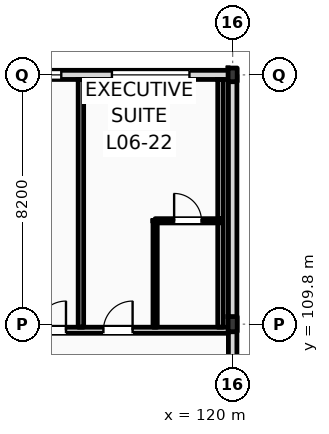
"""IFC4 building model, lengths in metres.
Left out: names, types, materials, properties, quantities, classifications, styles, units other than length and angle.
Written with IfcOpenShell. Run it as: python <this file> out.ifc"""

import sys

from ifc_helpers import new_model, si_unit, direction, frame, frame_2d, origin, origin_2d, place, context, subcontext, project, spatial, rectangle, i_section, extrude, element, fill, save


model = new_model("IFC4")
c1 = context("Model", 3, precision=1e-05, world=origin(), true_north=direction((0.0, 1.0)))
c2 = subcontext(c1, "Body", "Model", "MODEL_VIEW")
j1 = project(units=[si_unit("LENGTHUNIT", "METRE"), si_unit("PLANEANGLEUNIT", "RADIAN")], contexts=[c1])
p1 = place(None, origin())
s1 = spatial("IfcSite", under=j1, at=p1, CompositionType="ELEMENT")
p2 = place(p1, origin())
s2 = spatial("IfcBuilding", under=s1, at=p2, CompositionType="ELEMENT")
p3 = place(p2, frame((0.0, 0.0, 28.2)))
s3 = spatial("IfcBuildingStorey", under=s2, at=p3, CompositionType="ELEMENT", Elevation=28.2)
p4 = place(p3, frame((120.0, 109.8, 0.0), z_axis=(0.0, 0.0, 1.0), x_axis=(1.0, 0.0, 0.0)))
e1 = element("IfcColumn", 1, at=p4, inside=s3, PredefinedType="COLUMN", context=c2, shape_type="SweptSolid", body=[
    extrude(i_section(OverallWidth=0.3, OverallDepth=0.5, WebThickness=0.014, FlangeThickness=0.028, FilletRadius=0.027, at=origin_2d()), origin(), (0.0, 0.0, 1.0), 3.6),
])
p5 = place(p3, frame((120.0, 118.0, 0.0), z_axis=(0.0, 0.0, 1.0), x_axis=(1.0, 0.0, 0.0)))
e2 = element("IfcColumn", 2, at=p5, inside=s3, PredefinedType="COLUMN", context=c2, shape_type="SweptSolid", body=[
    extrude(i_section(OverallWidth=0.3, OverallDepth=0.45, WebThickness=0.014, FlangeThickness=0.026, FilletRadius=0.027, at=origin_2d()), origin(), (0.0, 0.0, 1.0), 3.6),
])
p6 = place(p3, frame((22.5, 118.0, 0.0), z_axis=(0.0, 0.0, 1.0), x_axis=(1.0, 0.0, 0.0)))
e3 = element("IfcWall", 3, at=p6, inside=s3, PredefinedType="STANDARD", context=c2, shape_type="SweptSolid", body=[
    extrude(rectangle(XDim=97.5, YDim=0.3, at=frame_2d((48.75, 0.0))), origin(), (0.0, 0.0, 1.0), 2.8),
])
p7 = place(p6, frame((0.91, 0.0, 0.9)))
e4 = element("IfcOpeningElement", 4, at=p7, cuts=e3, PredefinedType="OPENING", context=c2, shape_type="SweptSolid", body=[
    extrude(rectangle(XDim=0.9, YDim=1.72, at=frame_2d((0.45, 0.86))), frame((0.0, 0.16, 0.0), z_axis=(0.0, -1.0, 0.0), x_axis=(1.0, 0.0, 0.0)), (0.0, 0.0, 1.0), 0.32),
])
p8 = place(p6, frame((6.561, 0.0, 0.0)))
e5 = element("IfcOpeningElement", 5, at=p8, cuts=e3, PredefinedType="OPENING", context=c2, shape_type="SweptSolid", body=[
    extrude(rectangle(XDim=1.2, YDim=2.25, at=frame_2d((0.6, 1.125))), frame((0.0, 0.16, 0.0), z_axis=(0.0, -1.0, 0.0), x_axis=(1.0, 0.0, 0.0)), (0.0, 0.0, 1.0), 0.32),
])
p9 = place(p6, frame((11.477, 0.0, 0.9)))
e6 = element("IfcOpeningElement", 6, at=p9, cuts=e3, PredefinedType="OPENING", context=c2, shape_type="SweptSolid", body=[
    extrude(rectangle(XDim=1.1, YDim=1.5, at=frame_2d((0.55, 0.75))), frame((0.0, 0.16, 0.0), z_axis=(0.0, -1.0, 0.0), x_axis=(1.0, 0.0, 0.0)), (0.0, 0.0, 1.0), 0.32),
])
p10 = place(p6, frame((15.194, 0.0, 0.9)))
e7 = element("IfcOpeningElement", 7, at=p10, cuts=e3, PredefinedType="OPENING", context=c2, shape_type="SweptSolid", body=[
    extrude(rectangle(XDim=1.25, YDim=1.6, at=frame_2d((0.625, 0.8))), frame((0.0, 0.16, 0.0), z_axis=(0.0, -1.0, 0.0), x_axis=(1.0, 0.0, 0.0)), (0.0, 0.0, 1.0), 0.32),
])
p11 = place(p6, frame((19.509, 0.0, 0.9)))
e8 = element("IfcOpeningElement", 8, at=p11, cuts=e3, PredefinedType="OPENING", context=c2, shape_type="SweptSolid", body=[
    extrude(rectangle(XDim=1.4, YDim=1.7, at=frame_2d((0.7, 0.85))), frame((0.0, 0.16, 0.0), z_axis=(0.0, -1.0, 0.0), x_axis=(1.0, 0.0, 0.0)), (0.0, 0.0, 1.0), 0.32),
])
p12 = place(p6, frame((23.258, 0.0, 0.0)))
e9 = element("IfcOpeningElement", 9, at=p12, cuts=e3, PredefinedType="OPENING", context=c2, shape_type="SweptSolid", body=[
    extrude(rectangle(XDim=1.2, YDim=2.25, at=frame_2d((0.6, 1.125))), frame((0.0, 0.16, 0.0), z_axis=(0.0, -1.0, 0.0), x_axis=(1.0, 0.0, 0.0)), (0.0, 0.0, 1.0), 0.32),
])
p13 = place(p6, frame((28.115, 0.0, 0.9)))
e10 = element("IfcOpeningElement", 10, at=p13, cuts=e3, PredefinedType="OPENING", context=c2, shape_type="SweptSolid", body=[
    extrude(rectangle(XDim=1.75, YDim=1.72, at=frame_2d((0.875, 0.86))), frame((0.0, 0.16, 0.0), z_axis=(0.0, -1.0, 0.0), x_axis=(1.0, 0.0, 0.0)), (0.0, 0.0, 1.0), 0.32),
])
p14 = place(p6, frame((31.582, 0.0, 0.9)))
e11 = element("IfcOpeningElement", 11, at=p14, cuts=e3, PredefinedType="OPENING", context=c2, shape_type="SweptSolid", body=[
    extrude(rectangle(XDim=1.35, YDim=1.72, at=frame_2d((0.675, 0.86))), frame((0.0, 0.16, 0.0), z_axis=(0.0, -1.0, 0.0), x_axis=(1.0, 0.0, 0.0)), (0.0, 0.0, 1.0), 0.32),
])
p15 = place(p6, frame((37.379, 0.0, 0.0)))
e12 = element("IfcOpeningElement", 12, at=p15, cuts=e3, PredefinedType="OPENING", context=c2, shape_type="SweptSolid", body=[
    extrude(rectangle(XDim=1.2, YDim=2.25, at=frame_2d((0.6, 1.125))), frame((0.0, 0.16, 0.0), z_axis=(0.0, -1.0, 0.0), x_axis=(1.0, 0.0, 0.0)), (0.0, 0.0, 1.0), 0.32),
])
p16 = place(p6, frame((42.663, 0.0, 0.9)))
e13 = element("IfcOpeningElement", 13, at=p16, cuts=e3, PredefinedType="OPENING", context=c2, shape_type="SweptSolid", body=[
    extrude(rectangle(XDim=1.35, YDim=1.72, at=frame_2d((0.675, 0.86))), frame((0.0, 0.16, 0.0), z_axis=(0.0, -1.0, 0.0), x_axis=(1.0, 0.0, 0.0)), (0.0, 0.0, 1.0), 0.32),
])
p17 = place(p6, frame((45.119, 0.0, 0.9)))
e14 = element("IfcOpeningElement", 14, at=p17, cuts=e3, PredefinedType="OPENING", context=c2, shape_type="SweptSolid", body=[
    extrude(rectangle(XDim=2.871, YDim=1.72, at=frame_2d((1.436, 0.86))), frame((0.0, 0.16, 0.0), z_axis=(0.0, -1.0, 0.0), x_axis=(1.0, 0.0, 0.0)), (0.0, 0.0, 1.0), 0.32),
])
p18 = place(p6, frame((50.41, 0.0, 0.9)))
e15 = element("IfcOpeningElement", 15, at=p18, cuts=e3, PredefinedType="OPENING", context=c2, shape_type="SweptSolid", body=[
    extrude(rectangle(XDim=1.8, YDim=1.72, at=frame_2d((0.9, 0.86))), frame((0.0, 0.16, 0.0), z_axis=(0.0, -1.0, 0.0), x_axis=(1.0, 0.0, 0.0)), (0.0, 0.0, 1.0), 0.32),
])
p19 = place(p6, frame((54.375, 0.0, 0.0)))
e16 = element("IfcOpeningElement", 16, at=p19, cuts=e3, PredefinedType="OPENING", context=c2, shape_type="SweptSolid", body=[
    extrude(rectangle(XDim=1.2, YDim=2.25, at=frame_2d((0.6, 1.125))), frame((0.0, 0.16, 0.0), z_axis=(0.0, -1.0, 0.0), x_axis=(1.0, 0.0, 0.0)), (0.0, 0.0, 1.0), 0.32),
])
p20 = place(p6, frame((59.052, 0.0, 0.9)))
e17 = element("IfcOpeningElement", 17, at=p20, cuts=e3, PredefinedType="OPENING", context=c2, shape_type="SweptSolid", body=[
    extrude(rectangle(XDim=1.35, YDim=1.72, at=frame_2d((0.675, 0.86))), frame((0.0, 0.16, 0.0), z_axis=(0.0, -1.0, 0.0), x_axis=(1.0, 0.0, 0.0)), (0.0, 0.0, 1.0), 0.32),
])
p21 = place(p6, frame((62.768, 0.0, 0.9)))
e18 = element("IfcOpeningElement", 18, at=p21, cuts=e3, PredefinedType="OPENING", context=c2, shape_type="SweptSolid", body=[
    extrude(rectangle(XDim=1.5, YDim=1.72, at=frame_2d((0.75, 0.86))), frame((0.0, 0.16, 0.0), z_axis=(0.0, -1.0, 0.0), x_axis=(1.0, 0.0, 0.0)), (0.0, 0.0, 1.0), 0.32),
])
p22 = place(p6, frame((68.498, 0.0, 0.0)))
e19 = element("IfcOpeningElement", 19, at=p22, cuts=e3, PredefinedType="OPENING", context=c2, shape_type="SweptSolid", body=[
    extrude(rectangle(XDim=1.2, YDim=2.25, at=frame_2d((0.6, 1.125))), frame((0.0, 0.16, 0.0), z_axis=(0.0, -1.0, 0.0), x_axis=(1.0, 0.0, 0.0)), (0.0, 0.0, 1.0), 0.32),
])
p23 = place(p6, frame((71.265, 0.0, 0.9)))
e20 = element("IfcOpeningElement", 20, at=p23, cuts=e3, PredefinedType="OPENING", context=c2, shape_type="SweptSolid", body=[
    extrude(rectangle(XDim=0.9, YDim=1.72, at=frame_2d((0.45, 0.86))), frame((0.0, 0.16, 0.0), z_axis=(0.0, -1.0, 0.0), x_axis=(1.0, 0.0, 0.0)), (0.0, 0.0, 1.0), 0.32),
])
p24 = place(p6, frame((76.316, 0.0, 0.9)))
e21 = element("IfcOpeningElement", 21, at=p24, cuts=e3, PredefinedType="OPENING", context=c2, shape_type="SweptSolid", body=[
    extrude(rectangle(XDim=1.95, YDim=1.72, at=frame_2d((0.975, 0.86))), frame((0.0, 0.16, 0.0), z_axis=(0.0, -1.0, 0.0), x_axis=(1.0, 0.0, 0.0)), (0.0, 0.0, 1.0), 0.32),
])
p25 = place(p6, frame((81.632, 0.0, 0.9)))
e22 = element("IfcOpeningElement", 22, at=p25, cuts=e3, PredefinedType="OPENING", context=c2, shape_type="SweptSolid", body=[
    extrude(rectangle(XDim=1.35, YDim=1.72, at=frame_2d((0.675, 0.86))), frame((0.0, 0.16, 0.0), z_axis=(0.0, -1.0, 0.0), x_axis=(1.0, 0.0, 0.0)), (0.0, 0.0, 1.0), 0.32),
])
p26 = place(p6, frame((84.948, 0.0, 0.9)))
e23 = element("IfcOpeningElement", 23, at=p26, cuts=e3, PredefinedType="OPENING", context=c2, shape_type="SweptSolid", body=[
    extrude(rectangle(XDim=2.25, YDim=1.72, at=frame_2d((1.125, 0.86))), frame((0.0, 0.16, 0.0), z_axis=(0.0, -1.0, 0.0), x_axis=(1.0, 0.0, 0.0)), (0.0, 0.0, 1.0), 0.32),
])
p27 = place(p6, frame((90.063, 0.0, 0.9)))
e24 = element("IfcOpeningElement", 24, at=p27, cuts=e3, PredefinedType="OPENING", context=c2, shape_type="SweptSolid", body=[
    extrude(rectangle(XDim=1.8, YDim=1.72, at=frame_2d((0.9, 0.86))), frame((0.0, 0.16, 0.0), z_axis=(0.0, -1.0, 0.0), x_axis=(1.0, 0.0, 0.0)), (0.0, 0.0, 1.0), 0.32),
])
p28 = place(p6, frame((93.529, 0.0, 0.9)))
e25 = element("IfcOpeningElement", 25, at=p28, cuts=e3, PredefinedType="OPENING", context=c2, shape_type="SweptSolid", body=[
    extrude(rectangle(XDim=2.55, YDim=1.72, at=frame_2d((1.275, 0.86))), frame((0.0, 0.16, 0.0), z_axis=(0.0, -1.0, 0.0), x_axis=(1.0, 0.0, 0.0)), (0.0, 0.0, 1.0), 0.32),
])
p29 = place(p3, frame((120.0, 96.0, 0.0), z_axis=(0.0, 0.0, 1.0), x_axis=(0.0, 1.0, 0.0)))
e26 = element("IfcWall", 26, at=p29, inside=s3, PredefinedType="STANDARD", context=c2, shape_type="SweptSolid", body=[
    extrude(rectangle(XDim=22.0, YDim=0.28, at=frame_2d((11.0, 0.0))), origin(), (0.0, 0.0, 1.0), 2.99),
])
p30 = place(p3, frame((10.65, 109.6, 0.0), z_axis=(0.0, 0.0, 1.0), x_axis=(1.0, 0.0, 0.0)))
e27 = element("IfcWall", 27, at=p30, inside=s3, PredefinedType="PARTITIONING", context=c2, shape_type="SweptSolid", body=[
    extrude(rectangle(XDim=109.21, YDim=0.2, at=frame_2d((54.605, 0.0))), origin(), (0.0, 0.0, 1.0), 2.8),
])
p31 = place(p30, frame((12.611, 0.0, 0.0)))
e28 = element("IfcOpeningElement", 28, at=p31, cuts=e27, PredefinedType="OPENING", context=c2, shape_type="SweptSolid", body=[
    extrude(rectangle(XDim=1.02, YDim=2.2, at=frame_2d((0.51, 1.1))), frame((0.0, 0.11, 0.0), z_axis=(0.0, -1.0, 0.0), x_axis=(1.0, 0.0, 0.0)), (0.0, 0.0, 1.0), 0.22),
])
p32 = place(p30, frame((19.451, 0.0, 0.0)))
e29 = element("IfcOpeningElement", 29, at=p32, cuts=e27, PredefinedType="OPENING", context=c2, shape_type="SweptSolid", body=[
    extrude(rectangle(XDim=1.02, YDim=2.2, at=frame_2d((0.51, 1.1))), frame((0.0, 0.11, 0.0), z_axis=(0.0, -1.0, 0.0), x_axis=(1.0, 0.0, 0.0)), (0.0, 0.0, 1.0), 0.22),
])
p33 = place(p30, frame((23.842, 0.0, 0.0)))
e30 = element("IfcOpeningElement", 30, at=p33, cuts=e27, PredefinedType="OPENING", context=c2, shape_type="SweptSolid", body=[
    extrude(rectangle(XDim=1.02, YDim=2.2, at=frame_2d((0.51, 1.1))), frame((0.0, 0.11, 0.0), z_axis=(0.0, -1.0, 0.0), x_axis=(1.0, 0.0, 0.0)), (0.0, 0.0, 1.0), 0.22),
])
p34 = place(p30, frame((26.084, 0.0, 0.0)))
e31 = element("IfcOpeningElement", 31, at=p34, cuts=e27, PredefinedType="OPENING", context=c2, shape_type="SweptSolid", body=[
    extrude(rectangle(XDim=1.02, YDim=2.2, at=frame_2d((0.51, 1.1))), frame((0.0, 0.11, 0.0), z_axis=(0.0, -1.0, 0.0), x_axis=(1.0, 0.0, 0.0)), (0.0, 0.0, 1.0), 0.22),
])
p35 = place(p30, frame((32.655, 0.0, 0.0)))
e32 = element("IfcOpeningElement", 32, at=p35, cuts=e27, PredefinedType="OPENING", context=c2, shape_type="SweptSolid", body=[
    extrude(rectangle(XDim=0.96, YDim=2.2, at=frame_2d((0.48, 1.1))), frame((0.0, 0.11, 0.0), z_axis=(0.0, -1.0, 0.0), x_axis=(1.0, 0.0, 0.0)), (0.0, 0.0, 1.0), 0.22),
])
p36 = place(p30, frame((34.895, 0.0, 0.0)))
e33 = element("IfcOpeningElement", 33, at=p36, cuts=e27, PredefinedType="OPENING", context=c2, shape_type="SweptSolid", body=[
    extrude(rectangle(XDim=0.96, YDim=2.2, at=frame_2d((0.48, 1.1))), frame((0.0, 0.11, 0.0), z_axis=(0.0, -1.0, 0.0), x_axis=(1.0, 0.0, 0.0)), (0.0, 0.0, 1.0), 0.22),
])
p37 = place(p30, frame((41.436, 0.0, 0.0)))
e34 = element("IfcOpeningElement", 34, at=p37, cuts=e27, PredefinedType="OPENING", context=c2, shape_type="SweptSolid", body=[
    extrude(rectangle(XDim=0.96, YDim=2.2, at=frame_2d((0.48, 1.1))), frame((0.0, 0.11, 0.0), z_axis=(0.0, -1.0, 0.0), x_axis=(1.0, 0.0, 0.0)), (0.0, 0.0, 1.0), 0.22),
])
p38 = place(p30, frame((43.427, 0.0, 0.0)))
e35 = element("IfcOpeningElement", 35, at=p38, cuts=e27, PredefinedType="OPENING", context=c2, shape_type="SweptSolid", body=[
    extrude(rectangle(XDim=0.96, YDim=2.2, at=frame_2d((0.48, 1.1))), frame((0.0, 0.11, 0.0), z_axis=(0.0, -1.0, 0.0), x_axis=(1.0, 0.0, 0.0)), (0.0, 0.0, 1.0), 0.22),
])
p39 = place(p30, frame((50.218, 0.0, 0.0)))
e36 = element("IfcOpeningElement", 36, at=p39, cuts=e27, PredefinedType="OPENING", context=c2, shape_type="SweptSolid", body=[
    extrude(rectangle(XDim=0.96, YDim=2.2, at=frame_2d((0.48, 1.1))), frame((0.0, 0.11, 0.0), z_axis=(0.0, -1.0, 0.0), x_axis=(1.0, 0.0, 0.0)), (0.0, 0.0, 1.0), 0.22),
])
p40 = place(p30, frame((54.859, 0.0, 0.0)))
e37 = element("IfcOpeningElement", 37, at=p40, cuts=e27, PredefinedType="OPENING", context=c2, shape_type="SweptSolid", body=[
    extrude(rectangle(XDim=0.96, YDim=2.2, at=frame_2d((0.48, 1.1))), frame((0.0, 0.11, 0.0), z_axis=(0.0, -1.0, 0.0), x_axis=(1.0, 0.0, 0.0)), (0.0, 0.0, 1.0), 0.22),
])
p41 = place(p30, frame((59.0, 0.0, 0.0)))
e38 = element("IfcOpeningElement", 38, at=p41, cuts=e27, PredefinedType="OPENING", context=c2, shape_type="SweptSolid", body=[
    extrude(rectangle(XDim=0.96, YDim=2.2, at=frame_2d((0.48, 1.1))), frame((0.0, 0.11, 0.0), z_axis=(0.0, -1.0, 0.0), x_axis=(1.0, 0.0, 0.0)), (0.0, 0.0, 1.0), 0.22),
])
p42 = place(p30, frame((63.39, 0.0, 0.0)))
e39 = element("IfcOpeningElement", 39, at=p42, cuts=e27, PredefinedType="OPENING", context=c2, shape_type="SweptSolid", body=[
    extrude(rectangle(XDim=0.96, YDim=2.2, at=frame_2d((0.48, 1.1))), frame((0.0, 0.11, 0.0), z_axis=(0.0, -1.0, 0.0), x_axis=(1.0, 0.0, 0.0)), (0.0, 0.0, 1.0), 0.22),
])
p43 = place(p30, frame((65.631, 0.0, 0.0)))
e40 = element("IfcOpeningElement", 40, at=p43, cuts=e27, PredefinedType="OPENING", context=c2, shape_type="SweptSolid", body=[
    extrude(rectangle(XDim=0.96, YDim=2.2, at=frame_2d((0.48, 1.1))), frame((0.0, 0.11, 0.0), z_axis=(0.0, -1.0, 0.0), x_axis=(1.0, 0.0, 0.0)), (0.0, 0.0, 1.0), 0.22),
])
p44 = place(p30, frame((72.172, 0.0, 0.0)))
e41 = element("IfcOpeningElement", 41, at=p44, cuts=e27, PredefinedType="OPENING", context=c2, shape_type="SweptSolid", body=[
    extrude(rectangle(XDim=0.96, YDim=2.2, at=frame_2d((0.48, 1.1))), frame((0.0, 0.11, 0.0), z_axis=(0.0, -1.0, 0.0), x_axis=(1.0, 0.0, 0.0)), (0.0, 0.0, 1.0), 0.22),
])
p45 = place(p30, frame((74.413, 0.0, 0.0)))
e42 = element("IfcOpeningElement", 42, at=p45, cuts=e27, PredefinedType="OPENING", context=c2, shape_type="SweptSolid", body=[
    extrude(rectangle(XDim=0.96, YDim=2.2, at=frame_2d((0.48, 1.1))), frame((0.0, 0.11, 0.0), z_axis=(0.0, -1.0, 0.0), x_axis=(1.0, 0.0, 0.0)), (0.0, 0.0, 1.0), 0.22),
])
p46 = place(p30, frame((80.954, 0.0, 0.0)))
e43 = element("IfcOpeningElement", 43, at=p46, cuts=e27, PredefinedType="OPENING", context=c2, shape_type="SweptSolid", body=[
    extrude(rectangle(XDim=0.96, YDim=2.2, at=frame_2d((0.48, 1.1))), frame((0.0, 0.11, 0.0), z_axis=(0.0, -1.0, 0.0), x_axis=(1.0, 0.0, 0.0)), (0.0, 0.0, 1.0), 0.22),
])
p47 = place(p30, frame((83.195, 0.0, 0.0)))
e44 = element("IfcOpeningElement", 44, at=p47, cuts=e27, PredefinedType="OPENING", context=c2, shape_type="SweptSolid", body=[
    extrude(rectangle(XDim=0.96, YDim=2.2, at=frame_2d((0.48, 1.1))), frame((0.0, 0.11, 0.0), z_axis=(0.0, -1.0, 0.0), x_axis=(1.0, 0.0, 0.0)), (0.0, 0.0, 1.0), 0.22),
])
p48 = place(p30, frame((89.735, 0.0, 0.0)))
e45 = element("IfcOpeningElement", 45, at=p48, cuts=e27, PredefinedType="OPENING", context=c2, shape_type="SweptSolid", body=[
    extrude(rectangle(XDim=0.96, YDim=2.2, at=frame_2d((0.48, 1.1))), frame((0.0, 0.11, 0.0), z_axis=(0.0, -1.0, 0.0), x_axis=(1.0, 0.0, 0.0)), (0.0, 0.0, 1.0), 0.22),
])
p49 = place(p30, frame((94.126, 0.0, 0.0)))
e46 = element("IfcOpeningElement", 46, at=p49, cuts=e27, PredefinedType="OPENING", context=c2, shape_type="SweptSolid", body=[
    extrude(rectangle(XDim=0.96, YDim=2.2, at=frame_2d((0.48, 1.1))), frame((0.0, 0.11, 0.0), z_axis=(0.0, -1.0, 0.0), x_axis=(1.0, 0.0, 0.0)), (0.0, 0.0, 1.0), 0.22),
])
p50 = place(p30, frame((98.517, 0.0, 0.0)))
e47 = element("IfcOpeningElement", 47, at=p50, cuts=e27, PredefinedType="OPENING", context=c2, shape_type="SweptSolid", body=[
    extrude(rectangle(XDim=0.96, YDim=2.2, at=frame_2d((0.48, 1.1))), frame((0.0, 0.11, 0.0), z_axis=(0.0, -1.0, 0.0), x_axis=(1.0, 0.0, 0.0)), (0.0, 0.0, 1.0), 0.22),
])
p51 = place(p30, frame((102.908, 0.0, 0.0)))
e48 = element("IfcOpeningElement", 48, at=p51, cuts=e27, PredefinedType="OPENING", context=c2, shape_type="SweptSolid", body=[
    extrude(rectangle(XDim=0.96, YDim=2.2, at=frame_2d((0.48, 1.1))), frame((0.0, 0.11, 0.0), z_axis=(0.0, -1.0, 0.0), x_axis=(1.0, 0.0, 0.0)), (0.0, 0.0, 1.0), 0.22),
])
p52 = place(p30, frame((105.099, 0.0, 0.0)))
e49 = element("IfcOpeningElement", 49, at=p52, cuts=e27, PredefinedType="OPENING", context=c2, shape_type="SweptSolid", body=[
    extrude(rectangle(XDim=0.96, YDim=2.2, at=frame_2d((0.48, 1.1))), frame((0.0, 0.11, 0.0), z_axis=(0.0, -1.0, 0.0), x_axis=(1.0, 0.0, 0.0)), (0.0, 0.0, 1.0), 0.22),
])
p53 = place(p30, frame((2.716, 0.0, 0.0)))
e50 = element("IfcOpeningElement", 50, at=p53, cuts=e27, PredefinedType="OPENING", context=c2, shape_type="SweptSolid", body=[
    extrude(rectangle(XDim=1.35, YDim=2.25, at=frame_2d((0.675, 1.125))), frame((0.0, 0.11, 0.0), z_axis=(0.0, -1.0, 0.0), x_axis=(1.0, 0.0, 0.0)), (0.0, 0.0, 1.0), 0.22),
])
p54 = place(p30, frame((6.65, 0.0, 0.0)))
e51 = element("IfcOpeningElement", 51, at=p54, cuts=e27, PredefinedType="OPENING", context=c2, shape_type="SweptSolid", body=[
    extrude(rectangle(XDim=1.35, YDim=2.25, at=frame_2d((0.675, 1.125))), frame((0.0, 0.11, 0.0), z_axis=(0.0, -1.0, 0.0), x_axis=(1.0, 0.0, 0.0)), (0.0, 0.0, 1.0), 0.22),
])
p55 = place(p30, frame((10.583, 0.0, 0.0)))
e52 = element("IfcOpeningElement", 52, at=p55, cuts=e27, PredefinedType="OPENING", context=c2, shape_type="SweptSolid", body=[
    extrude(rectangle(XDim=1.35, YDim=2.25, at=frame_2d((0.675, 1.125))), frame((0.0, 0.11, 0.0), z_axis=(0.0, -1.0, 0.0), x_axis=(1.0, 0.0, 0.0)), (0.0, 0.0, 1.0), 0.22),
])
for number, where, z_axis, x_axis in (
    (53, (115.009, 109.7, 0.0), (0.0, 0.0, 1.0), (0.0, 1.0, 0.0)),
    (54, (119.6, 109.7, 0.0), (0.0, 0.0, 1.0), (0.0, 1.0, 0.0)),
):
    element("IfcWall", number, at=place(p3, frame(where, z_axis=z_axis, x_axis=x_axis)), inside=s3, PredefinedType="PARTITIONING", context=c2, shape_type="SweptSolid", body=[
        extrude(rectangle(XDim=8.15, YDim=0.18, at=frame_2d((4.075, 0.0))), origin(), (0.0, 0.0, 1.0), 3.36),
    ])
p56 = place(p3, frame((117.45, 109.7, 0.0), z_axis=(0.0, 0.0, 1.0), x_axis=(0.0, 1.0, 0.0)))
e55 = element("IfcWall", 55, at=p56, inside=s3, PredefinedType="PARTITIONING", context=c2, shape_type="SweptSolid", body=[
    extrude(rectangle(XDim=3.5, YDim=0.14, at=frame_2d((1.75, 0.0))), origin(), (0.0, 0.0, 1.0), 3.36),
])
p57 = place(p3, frame((117.45, 113.2, 0.0), z_axis=(0.0, 0.0, 1.0), x_axis=(1.0, 0.0, 0.0)))
e56 = element("IfcWall", 56, at=p57, inside=s3, PredefinedType="PARTITIONING", context=c2, shape_type="SweptSolid", body=[
    extrude(rectangle(XDim=2.15, YDim=0.14, at=frame_2d((1.075, 0.0))), origin(), (0.0, 0.0, 1.0), 3.36),
])
p58 = place(p57, frame((0.625, 0.0, 0.0)))
e57 = element("IfcOpeningElement", 57, at=p58, cuts=e56, PredefinedType="OPENING", context=c2, shape_type="SweptSolid", body=[
    extrude(rectangle(XDim=0.9, YDim=2.1, at=frame_2d((0.45, 1.05))), frame((0.0, 0.08, 0.0), z_axis=(0.0, -1.0, 0.0), x_axis=(1.0, 0.0, 0.0)), (0.0, 0.0, 1.0), 0.16),
])
p59 = place(p27, origin())
e58 = element("IfcWindow", 58, at=p59, inside=s3, PartitioningType="DOUBLE_PANEL_VERTICAL", PredefinedType="WINDOW", context=c2, shape_type="SweptSolid", body=[
    extrude(rectangle(XDim=1.8, YDim=1.72, at=frame_2d((0.9, 0.86))), frame((0.0, 0.03, 0.0), z_axis=(0.0, -1.0, 0.0), x_axis=(1.0, 0.0, 0.0)), (0.0, 0.0, 1.0), 0.06),
])
fill(e24, e58)
p60 = place(p28, origin())
e59 = element("IfcWindow", 59, at=p60, inside=s3, PartitioningType="DOUBLE_PANEL_VERTICAL", PredefinedType="WINDOW", context=c2, shape_type="SweptSolid", body=[
    extrude(rectangle(XDim=2.55, YDim=1.72, at=frame_2d((1.275, 0.86))), frame((0.0, 0.03, 0.0), z_axis=(0.0, -1.0, 0.0), x_axis=(1.0, 0.0, 0.0)), (0.0, 0.0, 1.0), 0.06),
])
fill(e25, e59)
p61 = place(p51, origin())
e60 = element("IfcDoor", 60, at=p61, inside=s3, OperationType="SINGLE_SWING_RIGHT", PredefinedType="DOOR", context=c2, shape_type="SweptSolid", body=[
    extrude(rectangle(XDim=0.96, YDim=2.2, at=frame_2d((0.48, 1.1))), frame((0.0, 0.025, 0.0), z_axis=(0.0, -1.0, 0.0), x_axis=(1.0, 0.0, 0.0)), (0.0, 0.0, 1.0), 0.05),
])
fill(e48, e60)
p62 = place(p52, origin())
e61 = element("IfcDoor", 61, at=p62, inside=s3, OperationType="SINGLE_SWING_RIGHT", PredefinedType="DOOR", context=c2, shape_type="SweptSolid", body=[
    extrude(rectangle(XDim=0.96, YDim=2.2, at=frame_2d((0.48, 1.1))), frame((0.0, 0.025, 0.0), z_axis=(0.0, -1.0, 0.0), x_axis=(1.0, 0.0, 0.0)), (0.0, 0.0, 1.0), 0.05),
])
fill(e49, e61)
p63 = place(p58, origin())
e62 = element("IfcDoor", 62, at=p63, inside=s3, OperationType="SINGLE_SWING_LEFT", PredefinedType="DOOR", context=c2, shape_type="SweptSolid", body=[
    extrude(rectangle(XDim=0.9, YDim=2.1, at=frame_2d((0.45, 1.05))), frame((0.0, 0.025, 0.0), z_axis=(0.0, -1.0, 0.0), x_axis=(1.0, 0.0, 0.0)), (0.0, 0.0, 1.0), 0.05),
])
fill(e57, e62)
save(model, sys.argv[1])
